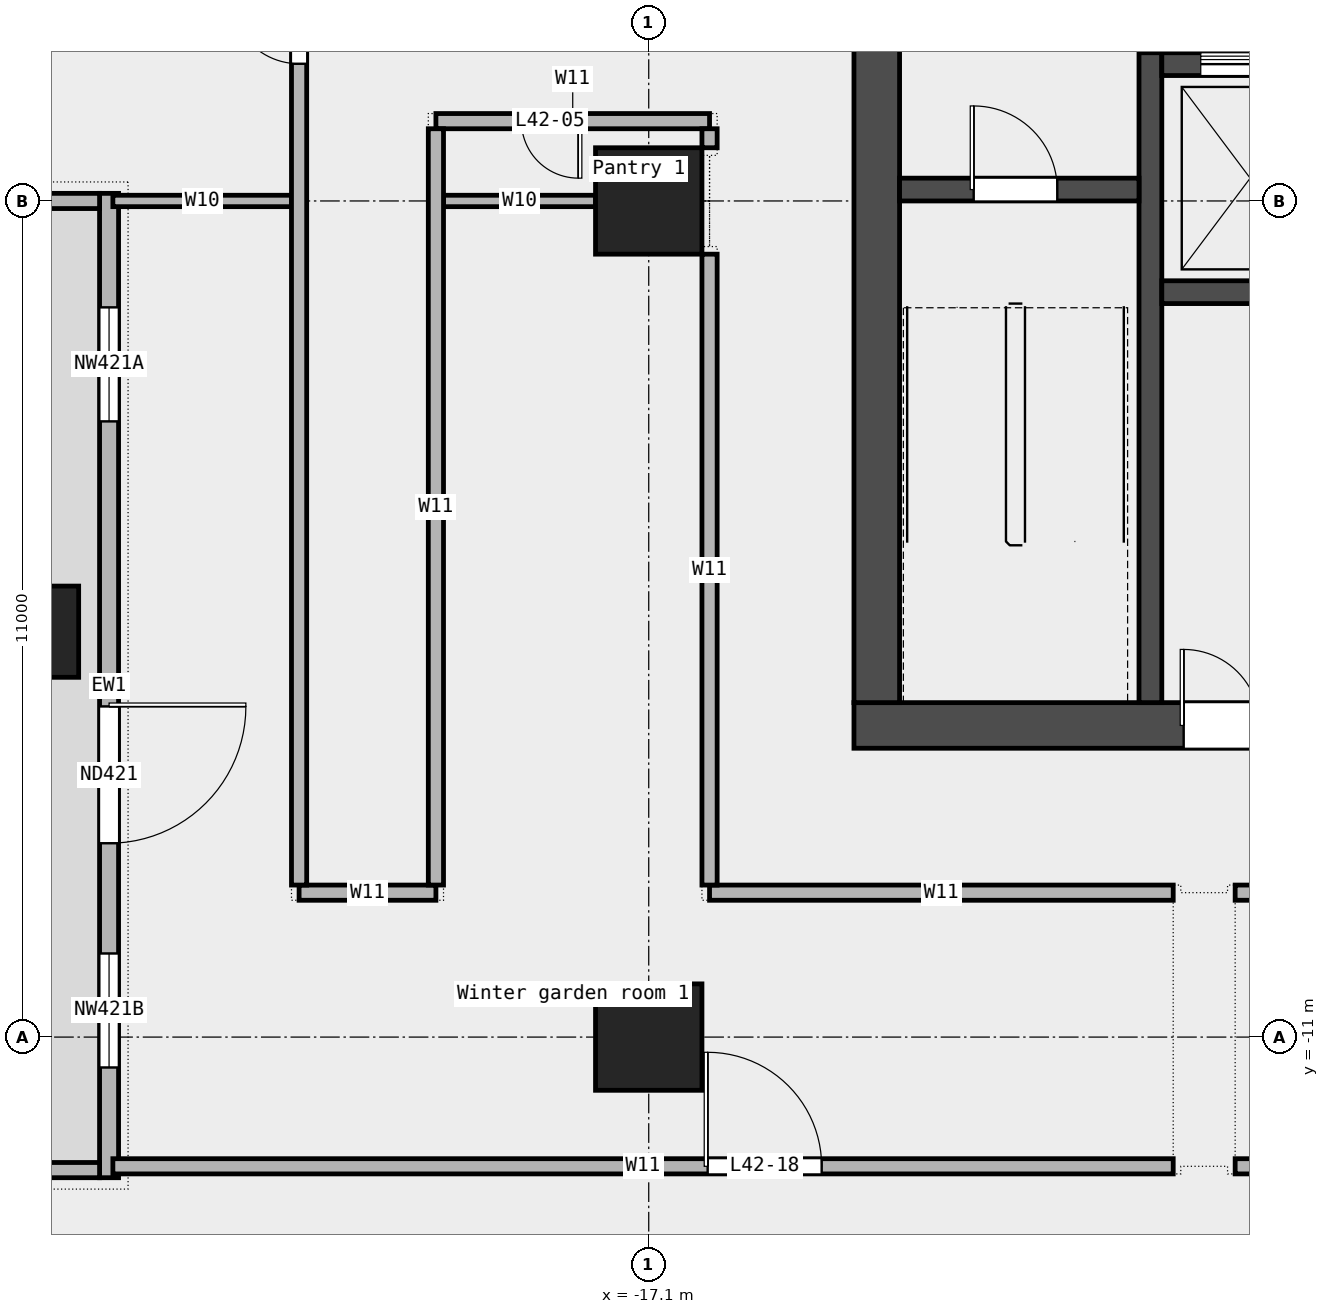
"""IFC4 building model, lengths in metres.
Left out: names, types, materials, properties, quantities, classifications, styles, units other than length and angle.
Written with IfcOpenShell. Run it as: python <this file> out.ifc"""

import sys

from ifc_helpers import new_model, si_unit, direction, frame, frame_2d, origin, origin_2d, place, context, subcontext, project, spatial, rectangle, extrude, element, fill, save


model = new_model("IFC4")
c1 = context("Model", 3, precision=1e-05, world=origin(), true_north=direction((0.0, 1.0)))
c2 = subcontext(c1, "Body", "Model", "MODEL_VIEW")
j1 = project(units=[si_unit("LENGTHUNIT", "METRE"), si_unit("PLANEANGLEUNIT", "RADIAN")], contexts=[c1])
p1 = place(None, origin())
s1 = spatial("IfcSite", under=j1, at=p1, CompositionType="ELEMENT")
p2 = place(p1, origin())
s2 = spatial("IfcBuilding", under=s1, at=p2, CompositionType="ELEMENT")
p3 = place(p2, frame((0.0, 0.0, 201.0)))
s3 = spatial("IfcBuildingStorey", under=s2, at=p3, CompositionType="ELEMENT", Elevation=201.0)
p4 = place(p3, frame((-25.2, -5.667, 0.0), z_axis=(0.0, 0.0, 1.0), x_axis=(1.0, 0.0, 0.0)))
e1 = element("IfcColumn", 1, at=p4, inside=s3, PredefinedType="COLUMN", context=c2, shape_type="SweptSolid", body=[
    extrude(rectangle(XDim=1.2, YDim=1.2, at=origin_2d()), origin(), (0.0, 0.0, 1.0), 3.4),
])
for number, where, z_axis, x_axis in (
    (2, (-17.1, -11.0, 0.0), (0.0, 0.0, 1.0), (1.0, 0.0, 0.0)),
    (3, (-17.1, 0.0, 0.0), (0.0, 0.0, 1.0), (1.0, 0.0, 0.0)),
):
    element("IfcColumn", number, at=place(p3, frame(where, z_axis=z_axis, x_axis=x_axis)), inside=s3, PredefinedType="COLUMN", context=c2, shape_type="SweptSolid", body=[
        extrude(rectangle(XDim=1.4, YDim=1.4, at=origin_2d()), origin(), (0.0, 0.0, 1.0), 3.4),
    ])
p5 = place(p3, frame((-24.2, 0.1, 0.0), z_axis=(0.0, 0.0, 1.0), x_axis=(0.0, -1.0, 0.0)))
e4 = element("IfcWall", 4, at=p5, inside=s3, PredefinedType="STANDARD", context=c2, shape_type="SweptSolid", body=[
    extrude(rectangle(XDim=12.95, YDim=0.25, at=frame_2d((6.475, 0.0))), origin(), (0.0, 0.0, 1.0), 3.4),
])
p6 = place(p5, frame((1.5, 0.0, 0.45)))
e5 = element("IfcOpeningElement", 5, at=p6, cuts=e4, PredefinedType="OPENING", context=c2, shape_type="SweptSolid", body=[
    extrude(rectangle(XDim=1.5, YDim=2.4, at=frame_2d((0.75, 1.2))), frame((0.0, 0.137, 0.0), z_axis=(0.0, -1.0, 0.0), x_axis=(1.0, 0.0, 0.0)), (0.0, 0.0, 1.0), 0.274),
])
p7 = place(p5, frame((6.75, 0.0, 0.0)))
e6 = element("IfcOpeningElement", 6, at=p7, cuts=e4, PredefinedType="OPENING", context=c2, shape_type="SweptSolid", body=[
    extrude(rectangle(XDim=1.8, YDim=2.4, at=frame_2d((0.9, 1.2))), frame((0.0, 0.137, 0.0), z_axis=(0.0, -1.0, 0.0), x_axis=(1.0, 0.0, 0.0)), (0.0, 0.0, 1.0), 0.274),
])
p8 = place(p5, frame((10.0, 0.0, 0.45)))
e7 = element("IfcOpeningElement", 7, at=p8, cuts=e4, PredefinedType="OPENING", context=c2, shape_type="SweptSolid", body=[
    extrude(rectangle(XDim=1.5, YDim=2.4, at=frame_2d((0.75, 1.2))), frame((0.0, 0.137, 0.0), z_axis=(0.0, -1.0, 0.0), x_axis=(1.0, 0.0, 0.0)), (0.0, 0.0, 1.0), 0.274),
])
for number, where, z_axis, x_axis in (
    (8, (-26.2, 0.0, 0.0), (0.0, 0.0, 1.0), (1.0, 0.0, 0.0)),
    (9, (-26.2, -12.75, 0.0), (0.0, 0.0, 1.0), (1.0, 0.0, 0.0)),
):
    element("IfcWall", number, at=place(p3, frame(where, z_axis=z_axis, x_axis=x_axis)), inside=s3, PredefinedType="STANDARD", context=c2, shape_type="SweptSolid", body=[
        extrude(rectangle(XDim=1.875, YDim=0.2, at=frame_2d((0.938, 0.0))), origin(), (0.0, 0.0, 1.0), 3.4),
    ])
p9 = place(p3, frame((-24.15, -12.7, 0.0), z_axis=(0.0, 0.0, 1.0), x_axis=(1.0, 0.0, 0.0)))
e10 = element("IfcWall", 10, at=p9, inside=s3, PredefinedType="PARTITIONING", context=c2, shape_type="SweptSolid", body=[
    extrude(rectangle(XDim=13.95, YDim=0.2, at=frame_2d((6.975, 0.0))), origin(), (0.0, 0.0, 1.0), 3.4),
])
p10 = place(p9, frame((7.825, 0.0, 0.0)))
e11 = element("IfcOpeningElement", 11, at=p10, cuts=e10, PredefinedType="OPENING", context=c2, shape_type="SweptSolid", body=[
    extrude(rectangle(XDim=1.5, YDim=2.1, at=frame_2d((0.75, 1.05))), frame((0.0, 0.112, 0.0), z_axis=(0.0, -1.0, 0.0), x_axis=(1.0, 0.0, 0.0)), (0.0, 0.0, 1.0), 0.224),
])
p11 = place(p3, frame((-9.385, -12.7, 0.0), z_axis=(0.0, 0.0, 1.0), x_axis=(1.0, 0.0, 0.0)))
e12 = element("IfcWall", 12, at=p11, inside=s3, PredefinedType="PARTITIONING", context=c2, shape_type="SweptSolid", body=[
    extrude(rectangle(XDim=12.425, YDim=0.2, at=frame_2d((6.212, 0.0))), origin(), (0.0, 0.0, 1.0), 3.4),
])
p12 = place(p3, frame((-21.7, -9.1, 0.0), z_axis=(0.0, 0.0, 1.0), x_axis=(1.0, 0.0, 0.0)))
e13 = element("IfcWall", 13, at=p12, inside=s3, PredefinedType="PARTITIONING", context=c2, shape_type="SweptSolid", body=[
    extrude(rectangle(XDim=1.8, YDim=0.2, at=frame_2d((0.9, 0.0))), origin(), (0.0, 0.0, 1.0), 3.4),
])
p13 = place(p3, frame((-16.3, -9.1, 0.0), z_axis=(0.0, 0.0, 1.0), x_axis=(1.0, 0.0, 0.0)))
e14 = element("IfcWall", 14, at=p13, inside=s3, PredefinedType="PARTITIONING", context=c2, shape_type="SweptSolid", body=[
    extrude(rectangle(XDim=6.1, YDim=0.2, at=frame_2d((3.05, 0.0))), origin(), (0.0, 0.0, 1.0), 3.4),
])
p14 = place(p3, frame((-9.385, -9.1, 0.0), z_axis=(0.0, 0.0, 1.0), x_axis=(1.0, 0.0, 0.0)))
e15 = element("IfcWall", 15, at=p14, inside=s3, PredefinedType="PARTITIONING", context=c2, shape_type="SweptSolid", body=[
    extrude(rectangle(XDim=12.425, YDim=0.2, at=frame_2d((6.212, 0.0))), origin(), (0.0, 0.0, 1.0), 3.4),
])
p15 = place(p14, frame((5.762, 0.0, 0.0)))
e16 = element("IfcOpeningElement", 16, at=p15, cuts=e15, PredefinedType="OPENING", context=c2, shape_type="SweptSolid", body=[
    extrude(rectangle(XDim=0.9, YDim=2.1, at=frame_2d((0.45, 1.05))), frame((0.0, 0.112, 0.0), z_axis=(0.0, -1.0, 0.0), x_axis=(1.0, 0.0, 0.0)), (0.0, 0.0, 1.0), 0.224),
])
p16 = place(p3, frame((-24.15, 0.0, 0.0), z_axis=(0.0, 0.0, 1.0), x_axis=(1.0, 0.0, 0.0)))
e17 = element("IfcWall", 17, at=p16, inside=s3, PredefinedType="PARTITIONING", context=c2, shape_type="SweptSolid", body=[
    extrude(rectangle(XDim=2.35, YDim=0.15, at=frame_2d((1.175, 0.0))), origin(), (0.0, 0.0, 1.0), 3.4),
])
p17 = place(p3, frame((-19.8, 0.0, 0.0), z_axis=(0.0, 0.0, 1.0), x_axis=(1.0, 0.0, 0.0)))
e18 = element("IfcWall", 18, at=p17, inside=s3, PredefinedType="PARTITIONING", context=c2, shape_type="SweptSolid", body=[
    extrude(rectangle(XDim=2.0, YDim=0.15, at=frame_2d((1.0, 0.0))), origin(), (0.0, 0.0, 1.0), 3.4),
])
p18 = place(p3, frame((-19.9, 1.05, 0.0), z_axis=(0.0, 0.0, 1.0), x_axis=(1.0, 0.0, 0.0)))
e19 = element("IfcWall", 19, at=p18, inside=s3, PredefinedType="PARTITIONING", context=c2, shape_type="SweptSolid", body=[
    extrude(rectangle(XDim=3.6, YDim=0.2, at=frame_2d((1.8, 0.0))), origin(), (0.0, 0.0, 1.0), 3.4),
])
p19 = place(p18, frame((1.125, 0.0, 0.0)))
e20 = element("IfcOpeningElement", 20, at=p19, cuts=e19, PredefinedType="OPENING", context=c2, shape_type="SweptSolid", body=[
    extrude(rectangle(XDim=0.75, YDim=2.1, at=frame_2d((0.375, 1.05))), frame((0.0, 0.112, 0.0), z_axis=(0.0, -1.0, 0.0), x_axis=(1.0, 0.0, 0.0)), (0.0, 0.0, 1.0), 0.224),
])
p20 = place(p3, frame((-21.7, -9.0, 0.0), z_axis=(0.0, 0.0, 1.0), x_axis=(0.0, 1.0, 0.0)))
e21 = element("IfcWall", 21, at=p20, inside=s3, PredefinedType="PARTITIONING", context=c2, shape_type="SweptSolid", body=[
    extrude(rectangle(XDim=24.3, YDim=0.2, at=frame_2d((12.15, 0.0))), origin(), (0.0, 0.0, 1.0), 3.4),
])
p21 = place(p20, frame((18.305, 0.0, 0.0)))
e22 = element("IfcOpeningElement", 22, at=p21, cuts=e21, PredefinedType="OPENING", context=c2, shape_type="SweptSolid", body=[
    extrude(rectangle(XDim=1.2, YDim=2.1, at=frame_2d((0.6, 1.05))), frame((0.0, 0.112, 0.0), z_axis=(0.0, -1.0, 0.0), x_axis=(1.0, 0.0, 0.0)), (0.0, 0.0, 1.0), 0.224),
])
p22 = place(p20, frame((10.805, 0.0, 0.0)))
e23 = element("IfcOpeningElement", 23, at=p22, cuts=e21, PredefinedType="OPENING", context=c2, shape_type="SweptSolid", body=[
    extrude(rectangle(XDim=0.9, YDim=2.1, at=frame_2d((0.45, 1.05))), frame((0.0, 0.112, 0.0), z_axis=(0.0, -1.0, 0.0), x_axis=(1.0, 0.0, 0.0)), (0.0, 0.0, 1.0), 0.224),
])
p23 = place(p3, frame((-19.9, -9.0, 0.0), z_axis=(0.0, 0.0, 1.0), x_axis=(0.0, 1.0, 0.0)))
e24 = element("IfcWall", 24, at=p23, inside=s3, PredefinedType="PARTITIONING", context=c2, shape_type="SweptSolid", body=[
    extrude(rectangle(XDim=9.95, YDim=0.2, at=frame_2d((4.975, 0.0))), origin(), (0.0, 0.0, 1.0), 3.4),
])
p24 = place(p3, frame((-16.3, -9.0, 0.0), z_axis=(0.0, 0.0, 1.0), x_axis=(0.0, 1.0, 0.0)))
e25 = element("IfcWall", 25, at=p24, inside=s3, PredefinedType="PARTITIONING", context=c2, shape_type="SweptSolid", body=[
    extrude(rectangle(XDim=8.3, YDim=0.2, at=frame_2d((4.15, 0.0))), origin(), (0.0, 0.0, 1.0), 3.4),
])
p25 = place(p3, frame((-16.3, 0.7, 0.0), z_axis=(0.0, 0.0, 1.0), x_axis=(0.0, 1.0, 0.0)))
e26 = element("IfcWall", 26, at=p25, inside=s3, PredefinedType="PARTITIONING", context=c2, shape_type="SweptSolid", body=[
    extrude(rectangle(XDim=0.25, YDim=0.2, at=frame_2d((0.125, 0.0))), origin(), (0.0, 0.0, 1.0), 3.4),
])
p26 = place(p3, frame((-14.4, -6.9, 0.0), z_axis=(0.0, 0.0, 1.0), x_axis=(1.0, 0.0, 0.0)))
e27 = element("IfcWall", 27, at=p26, inside=s3, PredefinedType="SHEAR", context=c2, shape_type="SweptSolid", body=[
    extrude(rectangle(XDim=28.8, YDim=0.6, at=frame_2d((14.4, 0.0))), origin(), (0.0, 0.0, 1.0), 3.7),
])
p27 = place(p26, frame((4.337, 0.0, 0.0)))
e28 = element("IfcOpeningElement", 28, at=p27, cuts=e27, PredefinedType="OPENING", context=c2, shape_type="SweptSolid", body=[
    extrude(rectangle(XDim=1.0, YDim=2.1, at=frame_2d((0.5, 1.05))), frame((0.0, 0.312, 0.0), z_axis=(0.0, -1.0, 0.0), x_axis=(1.0, 0.0, 0.0)), (0.0, 0.0, 1.0), 0.624),
])
p28 = place(p26, frame((6.212, 0.0, 0.0)))
e29 = element("IfcOpeningElement", 29, at=p28, cuts=e27, PredefinedType="OPENING", context=c2, shape_type="SweptSolid", body=[
    extrude(rectangle(XDim=1.0, YDim=2.1, at=frame_2d((0.5, 1.05))), frame((0.0, 0.312, 0.0), z_axis=(0.0, -1.0, 0.0), x_axis=(1.0, 0.0, 0.0)), (0.0, 0.0, 1.0), 0.624),
])
p29 = place(p26, frame((8.462, 0.0, 0.0)))
e30 = element("IfcOpeningElement", 30, at=p29, cuts=e27, PredefinedType="OPENING", context=c2, shape_type="SweptSolid", body=[
    extrude(rectangle(XDim=1.0, YDim=2.1, at=frame_2d((0.5, 1.05))), frame((0.0, 0.312, 0.0), z_axis=(0.0, -1.0, 0.0), x_axis=(1.0, 0.0, 0.0)), (0.0, 0.0, 1.0), 0.624),
])
p30 = place(p26, frame((13.05, 0.0, 0.0)))
e31 = element("IfcOpeningElement", 31, at=p30, cuts=e27, PredefinedType="OPENING", context=c2, shape_type="SweptSolid", body=[
    extrude(rectangle(XDim=1.2, YDim=2.1, at=frame_2d((0.6, 1.05))), frame((0.0, 0.312, 0.0), z_axis=(0.0, -1.0, 0.0), x_axis=(1.0, 0.0, 0.0)), (0.0, 0.0, 1.0), 0.624),
])
p31 = place(p26, frame((18.75, 0.0, 0.0)))
e32 = element("IfcOpeningElement", 32, at=p31, cuts=e27, PredefinedType="OPENING", context=c2, shape_type="SweptSolid", body=[
    extrude(rectangle(XDim=1.8, YDim=2.1, at=frame_2d((0.9, 1.05))), frame((0.0, 0.312, 0.0), z_axis=(0.0, -1.0, 0.0), x_axis=(1.0, 0.0, 0.0)), (0.0, 0.0, 1.0), 0.624),
])
p32 = place(p26, frame((23.087, 0.0, 0.0)))
e33 = element("IfcOpeningElement", 33, at=p32, cuts=e27, PredefinedType="OPENING", context=c2, shape_type="SweptSolid", body=[
    extrude(rectangle(XDim=1.0, YDim=2.1, at=frame_2d((0.5, 1.05))), frame((0.0, 0.312, 0.0), z_axis=(0.0, -1.0, 0.0), x_axis=(1.0, 0.0, 0.0)), (0.0, 0.0, 1.0), 0.624),
])
p33 = place(p3, frame((-14.1, -6.6, 0.0), z_axis=(0.0, 0.0, 1.0), x_axis=(0.0, 1.0, 0.0)))
e34 = element("IfcWall", 34, at=p33, inside=s3, PredefinedType="SHEAR", context=c2, shape_type="SweptSolid", body=[
    extrude(rectangle(XDim=19.5, YDim=0.6, at=frame_2d((9.75, 0.0))), origin(), (0.0, 0.0, 1.0), 3.7),
])
p34 = place(p33, frame((9.3, 0.0, 0.0)))
e35 = element("IfcOpeningElement", 35, at=p34, cuts=e34, PredefinedType="OPENING", context=c2, shape_type="SweptSolid", body=[
    extrude(rectangle(XDim=1.8, YDim=2.1, at=frame_2d((0.9, 1.05))), frame((0.0, 0.312, 0.0), z_axis=(0.0, -1.0, 0.0), x_axis=(1.0, 0.0, 0.0)), (0.0, 0.0, 1.0), 0.624),
])
p35 = place(p3, frame((-10.5, -6.6, 0.0), z_axis=(0.0, 0.0, 1.0), x_axis=(0.0, 1.0, 0.0)))
e36 = element("IfcWall", 36, at=p35, inside=s3, PredefinedType="SHEAR", context=c2, shape_type="SweptSolid", body=[
    extrude(rectangle(XDim=8.55, YDim=0.3, at=frame_2d((4.275, 0.0))), origin(), (0.0, 0.0, 1.0), 3.7),
])
p36 = place(p3, frame((-13.8, 0.15, 0.0), z_axis=(0.0, 0.0, 1.0), x_axis=(1.0, 0.0, 0.0)))
e37 = element("IfcWall", 37, at=p36, inside=s3, PredefinedType="SOLIDWALL", context=c2, shape_type="SweptSolid", body=[
    extrude(rectangle(XDim=3.15, YDim=0.3, at=frame_2d((1.575, 0.0))), origin(), (0.0, 0.0, 1.0), 3.7),
])
p37 = place(p36, frame((0.975, 0.0, 0.0)))
e38 = element("IfcOpeningElement", 38, at=p37, cuts=e37, PredefinedType="OPENING", context=c2, shape_type="SweptSolid", body=[
    extrude(rectangle(XDim=1.1, YDim=2.1, at=frame_2d((0.55, 1.05))), frame((0.0, 0.162, 0.0), z_axis=(0.0, -1.0, 0.0), x_axis=(1.0, 0.0, 0.0)), (0.0, 0.0, 1.0), 0.324),
])
p38 = place(p3, frame((-10.35, -1.2, 0.0), z_axis=(0.0, 0.0, 1.0), x_axis=(1.0, 0.0, 0.0)))
e39 = element("IfcWall", 39, at=p38, inside=s3, PredefinedType="SOLIDWALL", context=c2, shape_type="SweptSolid", body=[
    extrude(rectangle(XDim=20.7, YDim=0.3, at=frame_2d((10.35, 0.0))), origin(), (0.0, 0.0, 1.0), 3.7),
])
p39 = place(p3, frame((-10.35, 1.8, 0.0), z_axis=(0.0, 0.0, 1.0), x_axis=(1.0, 0.0, 0.0)))
e40 = element("IfcWall", 40, at=p39, inside=s3, PredefinedType="SOLIDWALL", context=c2, shape_type="SweptSolid", body=[
    extrude(rectangle(XDim=20.7, YDim=0.3, at=frame_2d((10.35, 0.0))), origin(), (0.0, 0.0, 1.0), 3.7),
])
p40 = place(p39, frame((0.512, 0.0, 0.0)))
e41 = element("IfcOpeningElement", 41, at=p40, cuts=e40, PredefinedType="OPENING", context=c2, shape_type="SweptSolid", body=[
    extrude(rectangle(XDim=1.3, YDim=2.1, at=frame_2d((0.65, 1.05))), frame((0.0, 0.162, 0.0), z_axis=(0.0, -1.0, 0.0), x_axis=(1.0, 0.0, 0.0)), (0.0, 0.0, 1.0), 0.324),
])
p41 = place(p39, frame((5.863, 0.0, 0.0)))
e42 = element("IfcOpeningElement", 42, at=p41, cuts=e40, PredefinedType="OPENING", context=c2, shape_type="SweptSolid", body=[
    extrude(rectangle(XDim=1.1, YDim=2.1, at=frame_2d((0.55, 1.05))), frame((0.0, 0.162, 0.0), z_axis=(0.0, -1.0, 0.0), x_axis=(1.0, 0.0, 0.0)), (0.0, 0.0, 1.0), 0.324),
])
p42 = place(p39, frame((8.488, 0.0, 0.0)))
e43 = element("IfcOpeningElement", 43, at=p42, cuts=e40, PredefinedType="OPENING", context=c2, shape_type="SweptSolid", body=[
    extrude(rectangle(XDim=1.1, YDim=2.1, at=frame_2d((0.55, 1.05))), frame((0.0, 0.162, 0.0), z_axis=(0.0, -1.0, 0.0), x_axis=(1.0, 0.0, 0.0)), (0.0, 0.0, 1.0), 0.324),
])
p43 = place(p39, frame((11.113, 0.0, 0.0)))
e44 = element("IfcOpeningElement", 44, at=p43, cuts=e40, PredefinedType="OPENING", context=c2, shape_type="SweptSolid", body=[
    extrude(rectangle(XDim=1.1, YDim=2.1, at=frame_2d((0.55, 1.05))), frame((0.0, 0.162, 0.0), z_axis=(0.0, -1.0, 0.0), x_axis=(1.0, 0.0, 0.0)), (0.0, 0.0, 1.0), 0.324),
])
p44 = place(p39, frame((13.738, 0.0, 0.0)))
e45 = element("IfcOpeningElement", 45, at=p44, cuts=e40, PredefinedType="OPENING", context=c2, shape_type="SweptSolid", body=[
    extrude(rectangle(XDim=1.1, YDim=2.1, at=frame_2d((0.55, 1.05))), frame((0.0, 0.162, 0.0), z_axis=(0.0, -1.0, 0.0), x_axis=(1.0, 0.0, 0.0)), (0.0, 0.0, 1.0), 0.324),
])
p45 = place(p39, frame((16.363, 0.0, 0.0)))
e46 = element("IfcOpeningElement", 46, at=p45, cuts=e40, PredefinedType="OPENING", context=c2, shape_type="SweptSolid", body=[
    extrude(rectangle(XDim=1.1, YDim=2.1, at=frame_2d((0.55, 1.05))), frame((0.0, 0.162, 0.0), z_axis=(0.0, -1.0, 0.0), x_axis=(1.0, 0.0, 0.0)), (0.0, 0.0, 1.0), 0.324),
])
p46 = place(p39, frame((18.988, 0.0, 0.0)))
e47 = element("IfcOpeningElement", 47, at=p46, cuts=e40, PredefinedType="OPENING", context=c2, shape_type="SweptSolid", body=[
    extrude(rectangle(XDim=1.1, YDim=2.1, at=frame_2d((0.55, 1.05))), frame((0.0, 0.162, 0.0), z_axis=(0.0, -1.0, 0.0), x_axis=(1.0, 0.0, 0.0)), (0.0, 0.0, 1.0), 0.324),
])
p47 = place(p6, origin())
e48 = element("IfcWindow", 48, at=p47, inside=s3, PartitioningType="SINGLE_PANEL", PredefinedType="WINDOW", context=c2, shape_type="SweptSolid", body=[
    extrude(rectangle(XDim=1.5, YDim=2.4, at=frame_2d((0.75, 1.2))), frame((0.0, 0.03, 0.0), z_axis=(0.0, -1.0, 0.0), x_axis=(1.0, 0.0, 0.0)), (0.0, 0.0, 1.0), 0.06),
])
fill(e5, e48)
p48 = place(p7, origin())
e49 = element("IfcDoor", 49, at=p48, inside=s3, OperationType="DOUBLE_DOOR_SINGLE_SWING", PredefinedType="DOOR", context=c2, shape_type="SweptSolid", body=[
    extrude(rectangle(XDim=1.8, YDim=2.4, at=frame_2d((0.9, 1.2))), frame((0.0, 0.025, 0.0), z_axis=(0.0, -1.0, 0.0), x_axis=(1.0, 0.0, 0.0)), (0.0, 0.0, 1.0), 0.05),
])
fill(e6, e49)
p49 = place(p8, origin())
e50 = element("IfcWindow", 50, at=p49, inside=s3, PartitioningType="SINGLE_PANEL", PredefinedType="WINDOW", context=c2, shape_type="SweptSolid", body=[
    extrude(rectangle(XDim=1.5, YDim=2.4, at=frame_2d((0.75, 1.2))), frame((0.0, 0.03, 0.0), z_axis=(0.0, -1.0, 0.0), x_axis=(1.0, 0.0, 0.0)), (0.0, 0.0, 1.0), 0.06),
])
fill(e7, e50)
p50 = place(p19, origin())
e51 = element("IfcDoor", 51, at=p50, inside=s3, OperationType="SINGLE_SWING_LEFT", PredefinedType="DOOR", context=c2, shape_type="SweptSolid", body=[
    extrude(rectangle(XDim=0.75, YDim=2.1, at=frame_2d((0.375, 1.05))), frame((0.0, 0.025, 0.0), z_axis=(0.0, -1.0, 0.0), x_axis=(1.0, 0.0, 0.0)), (0.0, 0.0, 1.0), 0.05),
])
fill(e20, e51)
p51 = place(p22, origin())
e52 = element("IfcDoor", 52, at=p51, inside=s3, OperationType="SINGLE_SWING_RIGHT", PredefinedType="DOOR", context=c2, shape_type="SweptSolid", body=[
    extrude(rectangle(XDim=0.9, YDim=2.1, at=frame_2d((0.45, 1.05))), frame((0.0, 0.025, 0.0), z_axis=(0.0, -1.0, 0.0), x_axis=(1.0, 0.0, 0.0)), (0.0, 0.0, 1.0), 0.05),
])
fill(e23, e52)
p52 = place(p10, origin())
e53 = element("IfcDoor", 53, at=p52, inside=s3, OperationType="DOUBLE_DOOR_SINGLE_SWING", PredefinedType="DOOR", context=c2, shape_type="SweptSolid", body=[
    extrude(rectangle(XDim=1.5, YDim=2.1, at=frame_2d((0.75, 1.05))), frame((0.0, 0.025, 0.0), z_axis=(0.0, -1.0, 0.0), x_axis=(1.0, 0.0, 0.0)), (0.0, 0.0, 1.0), 0.05),
])
fill(e11, e53)
p53 = place(p37, origin())
e54 = element("IfcDoor", 54, at=p53, inside=s3, OperationType="SINGLE_SWING_LEFT", PredefinedType="DOOR", context=c2, shape_type="SweptSolid", body=[
    extrude(rectangle(XDim=1.1, YDim=2.1, at=frame_2d((0.55, 1.05))), frame((0.0, 0.025, 0.0), z_axis=(0.0, -1.0, 0.0), x_axis=(1.0, 0.0, 0.0)), (0.0, 0.0, 1.0), 0.05),
])
fill(e38, e54)
p54 = place(p40, origin())
e55 = element("IfcDoor", 55, at=p54, inside=s3, OperationType="DOUBLE_DOOR_SLIDING", PredefinedType="DOOR", context=c2, shape_type="SweptSolid", body=[
    extrude(rectangle(XDim=1.3, YDim=2.1, at=frame_2d((0.65, 1.05))), frame((0.0, 0.025, 0.0), z_axis=(0.0, -1.0, 0.0), x_axis=(1.0, 0.0, 0.0)), (0.0, 0.0, 1.0), 0.05),
])
fill(e41, e55)
p55 = place(p27, origin())
e56 = element("IfcDoor", 56, at=p55, inside=s3, OperationType="SINGLE_SWING_LEFT", PredefinedType="DOOR", context=c2, shape_type="SweptSolid", body=[
    extrude(rectangle(XDim=1.0, YDim=2.1, at=frame_2d((0.5, 1.05))), frame((0.0, 0.025, 0.0), z_axis=(0.0, -1.0, 0.0), x_axis=(1.0, 0.0, 0.0)), (0.0, 0.0, 1.0), 0.05),
])
fill(e28, e56)
save(model, sys.argv[1])
